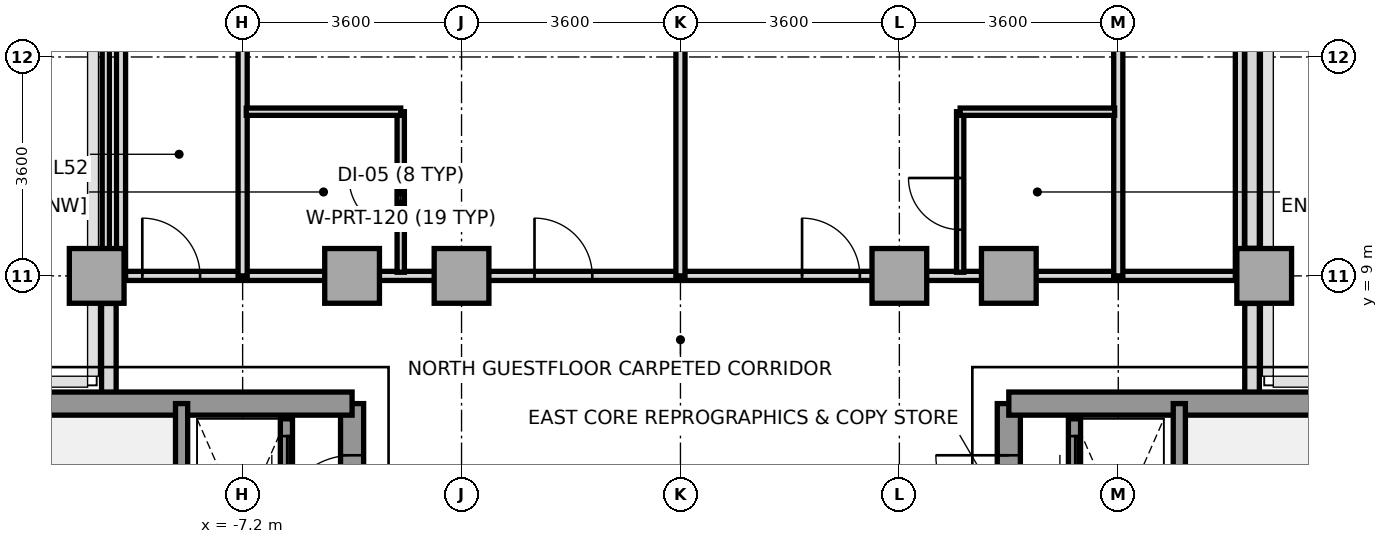
"""IFC4 building model, lengths in metres.
Left out: names, types, materials, properties, quantities, classifications, styles, units other than length and angle.
Written with IfcOpenShell. Run it as: python <this file> out.ifc"""

import sys

from ifc_helpers import new_model, si_unit, direction, frame, frame_2d, origin, origin_2d, place, context, subcontext, project, spatial, rectangle, extrude, source, transform, mapped, element, fill, save


model = new_model("IFC4")
c1 = context("Model", 3, precision=1e-05, world=origin(), true_north=direction((0.0, 1.0)))
c2 = subcontext(c1, "Body", "Model", "MODEL_VIEW")
j1 = project(units=[si_unit("LENGTHUNIT", "METRE"), si_unit("PLANEANGLEUNIT", "RADIAN")], contexts=[c1])
p1 = place(None, origin())
s1 = spatial("IfcSite", under=j1, at=p1, CompositionType="ELEMENT")
p2 = place(p1, origin())
s2 = spatial("IfcBuilding", under=s1, at=p2, CompositionType="ELEMENT")
p3 = place(p2, frame((0.0, 0.0, 191.0)))
s3 = spatial("IfcBuildingStorey", under=s2, at=p3, CompositionType="ELEMENT", Elevation=191.0)
m1 = source(origin(), c2, "Body", "SweptSolid", [
    extrude(rectangle(XDim=0.9, YDim=0.9, at=origin_2d()), origin(), (0.0, 0.0, 1.0), 3.2),
])
for number, where, z_axis, x_axis in (
    (1, (-9.6, 9.0, 0.0), (0.0, 0.0, 1.0), (1.0, 0.0, 0.0)),
    (2, (-5.4, 9.0, 0.0), (0.0, 0.0, 1.0), (1.0, 0.0, 0.0)),
    (3, (-3.6, 9.0, 0.0), (0.0, 0.0, 1.0), (1.0, 0.0, 0.0)),
    (4, (3.6, 9.0, 0.0), (0.0, 0.0, 1.0), (1.0, 0.0, 0.0)),
    (5, (5.4, 9.0, 0.0), (0.0, 0.0, 1.0), (1.0, 0.0, 0.0)),
    (6, (9.6, 9.0, 0.0), (0.0, 0.0, 1.0), (1.0, 0.0, 0.0)),
):
    element("IfcColumn", number, at=place(p3, frame(where, z_axis=z_axis, x_axis=x_axis)), inside=s3, PredefinedType="COLUMN", context=c2, shape_type="MappedRepresentation", body=[
        mapped(m1, transform((0.0, 0.0, 0.0), x_axis=(1.0, 0.0, 0.0), y_axis=(0.0, 1.0, 0.0), z_axis=(0.0, 0.0, 1.0), scale=1.0)),
    ])
p4 = place(p3, frame((-9.4, 6.953, 0.0), z_axis=(0.0, 0.0, 1.0), x_axis=(0.0, 1.0, 0.0)))
e7 = element("IfcWall", 7, at=p4, inside=s3, PredefinedType="PARAPET", context=c2, shape_type="SweptSolid", body=[
    extrude(rectangle(XDim=1.594, YDim=0.24, at=frame_2d((0.797, 0.0))), origin(), (0.0, 0.0, 1.0), 1.15),
])
p5 = place(p3, frame((9.4, 15.358, 0.0), z_axis=(0.0, 0.0, 1.0), x_axis=(0.0, -1.0, 0.0)))
e8 = element("IfcWall", 8, at=p5, inside=s3, PredefinedType="PARAPET", context=c2, shape_type="SweptSolid", body=[
    extrude(rectangle(XDim=5.905, YDim=0.24, at=frame_2d((2.952, 0.0))), origin(), (0.0, 0.0, 1.0), 1.15),
])
p6 = place(p3, frame((9.4, 8.547, 0.0), z_axis=(0.0, 0.0, 1.0), x_axis=(0.0, -1.0, 0.0)))
e9 = element("IfcWall", 9, at=p6, inside=s3, PredefinedType="PARAPET", context=c2, shape_type="SweptSolid", body=[
    extrude(rectangle(XDim=1.594, YDim=0.24, at=frame_2d((0.797, 0.0))), origin(), (0.0, 0.0, 1.0), 1.15),
])
p7 = place(p3, frame((-5.4, -5.6, 0.0), z_axis=(0.0, 0.0, 1.0), x_axis=(0.0, 1.0, 0.0)))
e10 = element("IfcWall", 10, at=p7, inside=s3, PredefinedType="SHEAR", context=c2, shape_type="SweptSolid", body=[
    extrude(rectangle(XDim=12.5, YDim=0.38, at=frame_2d((6.25, 0.0))), origin(), (0.0, 0.0, 1.0), 3.2),
])
p8 = place(p7, frame((4.55, 0.0, 0.0)))
e11 = element("IfcOpeningElement", 11, at=p8, cuts=e10, PredefinedType="OPENING", context=c2, shape_type="SweptSolid", body=[
    extrude(rectangle(XDim=1.2, YDim=2.2, at=frame_2d((0.6, 1.1))), frame((0.0, 0.2, 0.0), z_axis=(0.0, -1.0, 0.0), x_axis=(1.0, 0.0, 0.0)), (0.0, 0.0, 1.0), 0.4),
])
p9 = place(p7, frame((10.45, 0.0, 0.0)))
e12 = element("IfcOpeningElement", 12, at=p9, cuts=e10, PredefinedType="OPENING", context=c2, shape_type="SweptSolid", body=[
    extrude(rectangle(XDim=1.2, YDim=2.2, at=frame_2d((0.6, 1.1))), frame((0.0, 0.2, 0.0), z_axis=(0.0, -1.0, 0.0), x_axis=(1.0, 0.0, 0.0)), (0.0, 0.0, 1.0), 0.4),
])
p10 = place(p7, frame((6.86, 0.0, 0.0)))
e13 = element("IfcOpeningElement", 13, at=p10, cuts=e10, PredefinedType="OPENING", context=c2, shape_type="SweptSolid", body=[
    extrude(rectangle(XDim=0.8, YDim=2.1, at=frame_2d((0.4, 1.05))), frame((0.0, 0.2, 0.0), z_axis=(0.0, -1.0, 0.0), x_axis=(1.0, 0.0, 0.0)), (0.0, 0.0, 1.0), 0.4),
])
p11 = place(p3, frame((-11.356, 6.9, 0.0), z_axis=(0.0, 0.0, 1.0), x_axis=(1.0, 0.0, 0.0)))
e14 = element("IfcWall", 14, at=p11, inside=s3, PredefinedType="SHEAR", context=c2, shape_type="SweptSolid", body=[
    extrude(rectangle(XDim=5.956, YDim=0.38, at=frame_2d((2.978, 0.0))), origin(), (0.0, 0.0, 1.0), 3.2),
])
p12 = place(p3, frame((-8.204, -0.016, 0.0), z_axis=(0.0, 0.0, 1.0), x_axis=(0.0, 1.0, 0.0)))
e15 = element("IfcWall", 15, at=p12, inside=s3, PredefinedType="SOLIDWALL", context=c2, shape_type="SweptSolid", body=[
    extrude(rectangle(XDim=6.916, YDim=0.2, at=frame_2d((3.458, 0.0))), origin(), (0.0, 0.0, 1.0), 3.2),
])
p13 = place(p12, frame((0.2, 0.0, 0.0)))
e16 = element("IfcOpeningElement", 16, at=p13, cuts=e15, PredefinedType="OPENING", context=c2, shape_type="SweptSolid", body=[
    extrude(rectangle(XDim=1.2, YDim=2.2, at=frame_2d((0.6, 1.1))), frame((0.0, 0.11, 0.0), z_axis=(0.0, -1.0, 0.0), x_axis=(1.0, 0.0, 0.0)), (0.0, 0.0, 1.0), 0.22),
])
p14 = place(p3, frame((5.4, -5.6, 0.0), z_axis=(0.0, 0.0, 1.0), x_axis=(0.0, 1.0, 0.0)))
e17 = element("IfcWall", 17, at=p14, inside=s3, PredefinedType="SHEAR", context=c2, shape_type="SweptSolid", body=[
    extrude(rectangle(XDim=12.5, YDim=0.38, at=frame_2d((6.25, 0.0))), origin(), (0.0, 0.0, 1.0), 3.2),
])
p15 = place(p14, frame((4.55, 0.0, 0.0)))
e18 = element("IfcOpeningElement", 18, at=p15, cuts=e17, PredefinedType="OPENING", context=c2, shape_type="SweptSolid", body=[
    extrude(rectangle(XDim=1.2, YDim=2.2, at=frame_2d((0.6, 1.1))), frame((0.0, 0.2, 0.0), z_axis=(0.0, -1.0, 0.0), x_axis=(1.0, 0.0, 0.0)), (0.0, 0.0, 1.0), 0.4),
])
p16 = place(p14, frame((10.45, 0.0, 0.0)))
e19 = element("IfcOpeningElement", 19, at=p16, cuts=e17, PredefinedType="OPENING", context=c2, shape_type="SweptSolid", body=[
    extrude(rectangle(XDim=1.2, YDim=2.2, at=frame_2d((0.6, 1.1))), frame((0.0, 0.2, 0.0), z_axis=(0.0, -1.0, 0.0), x_axis=(1.0, 0.0, 0.0)), (0.0, 0.0, 1.0), 0.4),
])
p17 = place(p14, frame((6.86, 0.0, 0.0)))
e20 = element("IfcOpeningElement", 20, at=p17, cuts=e17, PredefinedType="OPENING", context=c2, shape_type="SweptSolid", body=[
    extrude(rectangle(XDim=0.8, YDim=2.1, at=frame_2d((0.4, 1.05))), frame((0.0, 0.2, 0.0), z_axis=(0.0, -1.0, 0.0), x_axis=(1.0, 0.0, 0.0)), (0.0, 0.0, 1.0), 0.4),
])
p18 = place(p14, frame((7.88, 0.0, 0.0)))
e21 = element("IfcOpeningElement", 21, at=p18, cuts=e17, PredefinedType="OPENING", context=c2, shape_type="SweptSolid", body=[
    extrude(rectangle(XDim=0.8, YDim=2.1, at=frame_2d((0.4, 1.05))), frame((0.0, 0.2, 0.0), z_axis=(0.0, -1.0, 0.0), x_axis=(1.0, 0.0, 0.0)), (0.0, 0.0, 1.0), 0.4),
])
p19 = place(p3, frame((5.4, 6.9, 0.0), z_axis=(0.0, 0.0, 1.0), x_axis=(1.0, 0.0, 0.0)))
e22 = element("IfcWall", 22, at=p19, inside=s3, PredefinedType="SHEAR", context=c2, shape_type="SweptSolid", body=[
    extrude(rectangle(XDim=5.956, YDim=0.38, at=frame_2d((2.978, 0.0))), origin(), (0.0, 0.0, 1.0), 3.2),
])
p20 = place(p3, frame((8.204, -0.016, 0.0), z_axis=(0.0, 0.0, 1.0), x_axis=(0.0, 1.0, 0.0)))
e23 = element("IfcWall", 23, at=p20, inside=s3, PredefinedType="SOLIDWALL", context=c2, shape_type="SweptSolid", body=[
    extrude(rectangle(XDim=6.916, YDim=0.2, at=frame_2d((3.458, 0.0))), origin(), (0.0, 0.0, 1.0), 3.2),
])
p21 = place(p20, frame((0.2, 0.0, 0.0)))
e24 = element("IfcOpeningElement", 24, at=p21, cuts=e23, PredefinedType="OPENING", context=c2, shape_type="SweptSolid", body=[
    extrude(rectangle(XDim=1.2, YDim=2.2, at=frame_2d((0.6, 1.1))), frame((0.0, 0.11, 0.0), z_axis=(0.0, -1.0, 0.0), x_axis=(1.0, 0.0, 0.0)), (0.0, 0.0, 1.0), 0.22),
])
p22 = place(p3, frame((-6.48, 4.98, 0.0), z_axis=(0.0, 0.0, 1.0), x_axis=(0.0, 1.0, 0.0)))
e25 = element("IfcWall", 25, at=p22, inside=s3, PredefinedType="SOLIDWALL", context=c2, shape_type="SweptSolid", body=[
    extrude(rectangle(XDim=1.67, YDim=0.2, at=frame_2d((0.835, 0.0))), origin(), (0.0, 0.0, 1.0), 3.2),
])
p23 = place(p22, frame((0.285, 0.0, 0.0)))
e26 = element("IfcOpeningElement", 26, at=p23, cuts=e25, PredefinedType="OPENING", context=c2, shape_type="SweptSolid", body=[
    extrude(rectangle(XDim=1.1, YDim=2.2, at=frame_2d((0.55, 1.1))), frame((0.0, 0.11, 0.0), z_axis=(0.0, -1.0, 0.0), x_axis=(1.0, 0.0, 0.0)), (0.0, 0.0, 1.0), 0.22),
])
p24 = place(p3, frame((6.48, 4.98, 0.0), z_axis=(0.0, 0.0, 1.0), x_axis=(0.0, 1.0, 0.0)))
e27 = element("IfcWall", 27, at=p24, inside=s3, PredefinedType="SOLIDWALL", context=c2, shape_type="SweptSolid", body=[
    extrude(rectangle(XDim=1.67, YDim=0.2, at=frame_2d((0.835, 0.0))), origin(), (0.0, 0.0, 1.0), 3.2),
])
p25 = place(p24, frame((0.285, 0.0, 0.0)))
e28 = element("IfcOpeningElement", 28, at=p25, cuts=e27, PredefinedType="OPENING", context=c2, shape_type="SweptSolid", body=[
    extrude(rectangle(XDim=1.1, YDim=2.2, at=frame_2d((0.55, 1.1))), frame((0.0, 0.11, 0.0), z_axis=(0.0, -1.0, 0.0), x_axis=(1.0, 0.0, 0.0)), (0.0, 0.0, 1.0), 0.22),
])
p26 = place(p3, frame((-9.55, 9.0, 0.0), z_axis=(0.0, 0.0, 1.0), x_axis=(1.0, 0.0, 0.0)))
e29 = element("IfcWall", 29, at=p26, inside=s3, PredefinedType="PARTITIONING", context=c2, shape_type="SweptSolid", body=[
    extrude(rectangle(XDim=19.1, YDim=0.15, at=frame_2d((9.55, 0.0))), origin(), (0.0, 0.0, 1.0), 2.75),
])
p27 = place(p26, frame((0.7, 0.0, 0.0)))
e30 = element("IfcOpeningElement", 30, at=p27, cuts=e29, PredefinedType="OPENING", context=c2, shape_type="SweptSolid", body=[
    extrude(rectangle(XDim=0.95, YDim=2.15, at=frame_2d((0.475, 1.075))), frame((0.0, 0.085, 0.0), z_axis=(0.0, -1.0, 0.0), x_axis=(1.0, 0.0, 0.0)), (0.0, 0.0, 1.0), 0.17),
])
p28 = place(p26, frame((7.15, 0.0, 0.0)))
e31 = element("IfcOpeningElement", 31, at=p28, cuts=e29, PredefinedType="OPENING", context=c2, shape_type="SweptSolid", body=[
    extrude(rectangle(XDim=0.95, YDim=2.15, at=frame_2d((0.475, 1.075))), frame((0.0, 0.085, 0.0), z_axis=(0.0, -1.0, 0.0), x_axis=(1.0, 0.0, 0.0)), (0.0, 0.0, 1.0), 0.17),
])
p29 = place(p26, frame((11.55, 0.0, 0.0)))
e32 = element("IfcOpeningElement", 32, at=p29, cuts=e29, PredefinedType="OPENING", context=c2, shape_type="SweptSolid", body=[
    extrude(rectangle(XDim=0.95, YDim=2.15, at=frame_2d((0.475, 1.075))), frame((0.0, 0.085, 0.0), z_axis=(0.0, -1.0, 0.0), x_axis=(1.0, 0.0, 0.0)), (0.0, 0.0, 1.0), 0.17),
])
for number, where, z_axis, x_axis in (
    (33, (-9.2, 9.0, 0.0), (0.0, 0.0, 1.0), (0.0, 1.0, 0.0)),
    (34, (9.2, 9.0, 0.0), (0.0, 0.0, 1.0), (0.0, 1.0, 0.0)),
):
    element("IfcWall", number, at=place(p3, frame(where, z_axis=z_axis, x_axis=x_axis)), inside=s3, PredefinedType="PARTITIONING", context=c2, shape_type="SweptSolid", body=[
        extrude(rectangle(XDim=6.68, YDim=0.15, at=frame_2d((3.34, 0.0))), origin(), (0.0, 0.0, 1.0), 2.75),
    ])
p30 = place(p3, frame((-7.2, 9.0, 0.0), z_axis=(0.0, 0.0, 1.0), x_axis=(0.0, 1.0, 0.0)))
e35 = element("IfcWall", 35, at=p30, inside=s3, PredefinedType="PARTITIONING", context=c2, shape_type="SweptSolid", body=[
    extrude(rectangle(XDim=14.4, YDim=0.15, at=frame_2d((7.2, 0.0))), origin(), (0.0, 0.0, 1.0), 2.75),
])
p31 = place(p3, frame((0.0, 9.0, 0.0), z_axis=(0.0, 0.0, 1.0), x_axis=(0.0, 1.0, 0.0)))
e36 = element("IfcWall", 36, at=p31, inside=s3, PredefinedType="PARTITIONING", context=c2, shape_type="SweptSolid", body=[
    extrude(rectangle(XDim=15.65, YDim=0.15, at=frame_2d((7.825, 0.0))), origin(), (0.0, 0.0, 1.0), 2.75),
])
p32 = place(p3, frame((7.2, 9.0, 0.0), z_axis=(0.0, 0.0, 1.0), x_axis=(0.0, 1.0, 0.0)))
e37 = element("IfcWall", 37, at=p32, inside=s3, PredefinedType="PARTITIONING", context=c2, shape_type="SweptSolid", body=[
    extrude(rectangle(XDim=14.4, YDim=0.15, at=frame_2d((7.2, 0.0))), origin(), (0.0, 0.0, 1.0), 2.75),
])
p33 = place(p3, frame((-9.45, 9.0, 0.0), z_axis=(0.0, 0.0, 1.0), x_axis=(0.0, 1.0, 0.0)))
e38 = element("IfcWall", 38, at=p33, inside=s3, PredefinedType="PARTITIONING", context=c2, shape_type="SweptSolid", body=[
    extrude(rectangle(XDim=4.0, YDim=0.12, at=frame_2d((2.0, 0.0))), origin(), (0.0, 0.0, 1.0), 3.2),
])
p34 = place(p3, frame((-4.6, 9.06, 0.0), z_axis=(0.0, 0.0, 1.0), x_axis=(0.0, 1.0, 0.0)))
e39 = element("IfcWall", 39, at=p34, inside=s3, PredefinedType="PARTITIONING", context=c2, shape_type="SweptSolid", body=[
    extrude(rectangle(XDim=2.64, YDim=0.12, at=frame_2d((1.32, 0.0))), origin(), (0.0, 0.0, 1.0), 3.2),
])
p35 = place(p34, frame((0.7, 0.0, 0.0)))
e40 = element("IfcOpeningElement", 40, at=p35, cuts=e39, PredefinedType="OPENING", context=c2, shape_type="SweptSolid", body=[
    extrude(rectangle(XDim=0.85, YDim=2.1, at=frame_2d((0.425, 1.05))), frame((0.0, 0.07, 0.0), z_axis=(0.0, -1.0, 0.0), x_axis=(1.0, 0.0, 0.0)), (0.0, 0.0, 1.0), 0.14),
])
p36 = place(p3, frame((-7.14, 11.7, 0.0), z_axis=(0.0, 0.0, 1.0), x_axis=(1.0, 0.0, 0.0)))
e41 = element("IfcWall", 41, at=p36, inside=s3, PredefinedType="PARTITIONING", context=c2, shape_type="SweptSolid", body=[
    extrude(rectangle(XDim=2.54, YDim=0.12, at=frame_2d((1.27, 0.0))), origin(), (0.0, 0.0, 1.0), 3.2),
])
p37 = place(p3, frame((4.6, 9.06, 0.0), z_axis=(0.0, 0.0, 1.0), x_axis=(0.0, 1.0, 0.0)))
e42 = element("IfcWall", 42, at=p37, inside=s3, PredefinedType="PARTITIONING", context=c2, shape_type="SweptSolid", body=[
    extrude(rectangle(XDim=2.64, YDim=0.12, at=frame_2d((1.32, 0.0))), origin(), (0.0, 0.0, 1.0), 3.2),
])
p38 = place(p37, frame((0.7, 0.0, 0.0)))
e43 = element("IfcOpeningElement", 43, at=p38, cuts=e42, PredefinedType="OPENING", context=c2, shape_type="SweptSolid", body=[
    extrude(rectangle(XDim=0.85, YDim=2.1, at=frame_2d((0.425, 1.05))), frame((0.0, 0.07, 0.0), z_axis=(0.0, -1.0, 0.0), x_axis=(1.0, 0.0, 0.0)), (0.0, 0.0, 1.0), 0.14),
])
p39 = place(p3, frame((4.6, 11.7, 0.0), z_axis=(0.0, 0.0, 1.0), x_axis=(1.0, 0.0, 0.0)))
e44 = element("IfcWall", 44, at=p39, inside=s3, PredefinedType="PARTITIONING", context=c2, shape_type="SweptSolid", body=[
    extrude(rectangle(XDim=2.54, YDim=0.12, at=frame_2d((1.27, 0.0))), origin(), (0.0, 0.0, 1.0), 3.2),
])
m2 = source(origin(), c2, "Body", "SweptSolid", [
    extrude(rectangle(XDim=1.2, YDim=2.2, at=frame_2d((0.6, 1.1))), frame((0.0, 0.025, 0.0), z_axis=(0.0, -1.0, 0.0), x_axis=(1.0, 0.0, 0.0)), (0.0, 0.0, 1.0), 0.05),
])
p40 = place(p9, origin())
e45 = element("IfcDoor", 45, at=p40, inside=s3, OperationType="SINGLE_SWING_LEFT", PredefinedType="DOOR", context=c2, shape_type="MappedRepresentation", body=[
    mapped(m2, transform((0.0, 0.0, 0.0), x_axis=(1.0, 0.0, 0.0), y_axis=(0.0, 1.0, 0.0), z_axis=(0.0, 0.0, 1.0), scale=1.0)),
])
fill(e12, e45)
p41 = place(p16, origin())
e46 = element("IfcDoor", 46, at=p41, inside=s3, OperationType="SINGLE_SWING_RIGHT", PredefinedType="DOOR", context=c2, shape_type="MappedRepresentation", body=[
    mapped(m2, transform((0.0, 0.0, 0.0), x_axis=(1.0, 0.0, 0.0), y_axis=(0.0, 1.0, 0.0), z_axis=(0.0, 0.0, 1.0), scale=1.0)),
])
fill(e19, e46)
m3 = source(origin(), c2, "Body", "SweptSolid", [
    extrude(rectangle(XDim=1.1, YDim=2.2, at=frame_2d((0.55, 1.1))), frame((0.0, 0.025, 0.0), z_axis=(0.0, -1.0, 0.0), x_axis=(1.0, 0.0, 0.0)), (0.0, 0.0, 1.0), 0.05),
])
p42 = place(p23, origin())
e47 = element("IfcDoor", 47, at=p42, inside=s3, OperationType="SLIDING_TO_LEFT", PredefinedType="DOOR", context=c2, shape_type="MappedRepresentation", body=[
    mapped(m3, transform((0.0, 0.0, 0.0), x_axis=(1.0, 0.0, 0.0), y_axis=(0.0, 1.0, 0.0), z_axis=(0.0, 0.0, 1.0), scale=1.0)),
])
fill(e26, e47)
p43 = place(p25, origin())
e48 = element("IfcDoor", 48, at=p43, inside=s3, OperationType="SLIDING_TO_LEFT", PredefinedType="DOOR", context=c2, shape_type="MappedRepresentation", body=[
    mapped(m3, transform((0.0, 0.0, 0.0), x_axis=(1.0, 0.0, 0.0), y_axis=(0.0, 1.0, 0.0), z_axis=(0.0, 0.0, 1.0), scale=1.0)),
])
fill(e28, e48)
m4 = source(origin(), c2, "Body", "SweptSolid", [
    extrude(rectangle(XDim=0.95, YDim=2.15, at=frame_2d((0.475, 1.075))), frame((0.0, 0.025, 0.0), z_axis=(0.0, -1.0, 0.0), x_axis=(1.0, 0.0, 0.0)), (0.0, 0.0, 1.0), 0.05),
])
p44 = place(p27, origin())
e49 = element("IfcDoor", 49, at=p44, inside=s3, OperationType="SINGLE_SWING_LEFT", PredefinedType="DOOR", context=c2, shape_type="MappedRepresentation", body=[
    mapped(m4, transform((0.0, 0.0, 0.0), x_axis=(1.0, 0.0, 0.0), y_axis=(0.0, 1.0, 0.0), z_axis=(0.0, 0.0, 1.0), scale=1.0)),
])
fill(e30, e49)
m5 = source(origin(), c2, "Body", "SweptSolid", [
    extrude(rectangle(XDim=0.85, YDim=2.1, at=frame_2d((0.425, 1.05))), frame((0.0, 0.025, 0.0), z_axis=(0.0, -1.0, 0.0), x_axis=(1.0, 0.0, 0.0)), (0.0, 0.0, 1.0), 0.05),
])
p45 = place(p35, origin())
e50 = element("IfcDoor", 50, at=p45, inside=s3, OperationType="SINGLE_SWING_RIGHT", PredefinedType="DOOR", context=c2, shape_type="MappedRepresentation", body=[
    mapped(m5, transform((0.0, 0.0, 0.0), x_axis=(1.0, 0.0, 0.0), y_axis=(0.0, 1.0, 0.0), z_axis=(0.0, 0.0, 1.0), scale=1.0)),
])
fill(e40, e50)
p46 = place(p28, origin())
e51 = element("IfcDoor", 51, at=p46, inside=s3, OperationType="SINGLE_SWING_LEFT", PredefinedType="DOOR", context=c2, shape_type="MappedRepresentation", body=[
    mapped(m4, transform((0.0, 0.0, 0.0), x_axis=(1.0, 0.0, 0.0), y_axis=(0.0, 1.0, 0.0), z_axis=(0.0, 0.0, 1.0), scale=1.0)),
])
fill(e31, e51)
p47 = place(p38, origin())
e52 = element("IfcDoor", 52, at=p47, inside=s3, OperationType="SINGLE_SWING_RIGHT", PredefinedType="DOOR", context=c2, shape_type="MappedRepresentation", body=[
    mapped(m5, transform((0.0, 0.0, 0.0), x_axis=(1.0, 0.0, 0.0), y_axis=(0.0, 1.0, 0.0), z_axis=(0.0, 0.0, 1.0), scale=1.0)),
])
fill(e43, e52)
p48 = place(p29, origin())
e53 = element("IfcDoor", 53, at=p48, inside=s3, OperationType="SINGLE_SWING_LEFT", PredefinedType="DOOR", context=c2, shape_type="MappedRepresentation", body=[
    mapped(m4, transform((0.0, 0.0, 0.0), x_axis=(1.0, 0.0, 0.0), y_axis=(0.0, 1.0, 0.0), z_axis=(0.0, 0.0, 1.0), scale=1.0)),
])
fill(e32, e53)
save(model, sys.argv[1])
